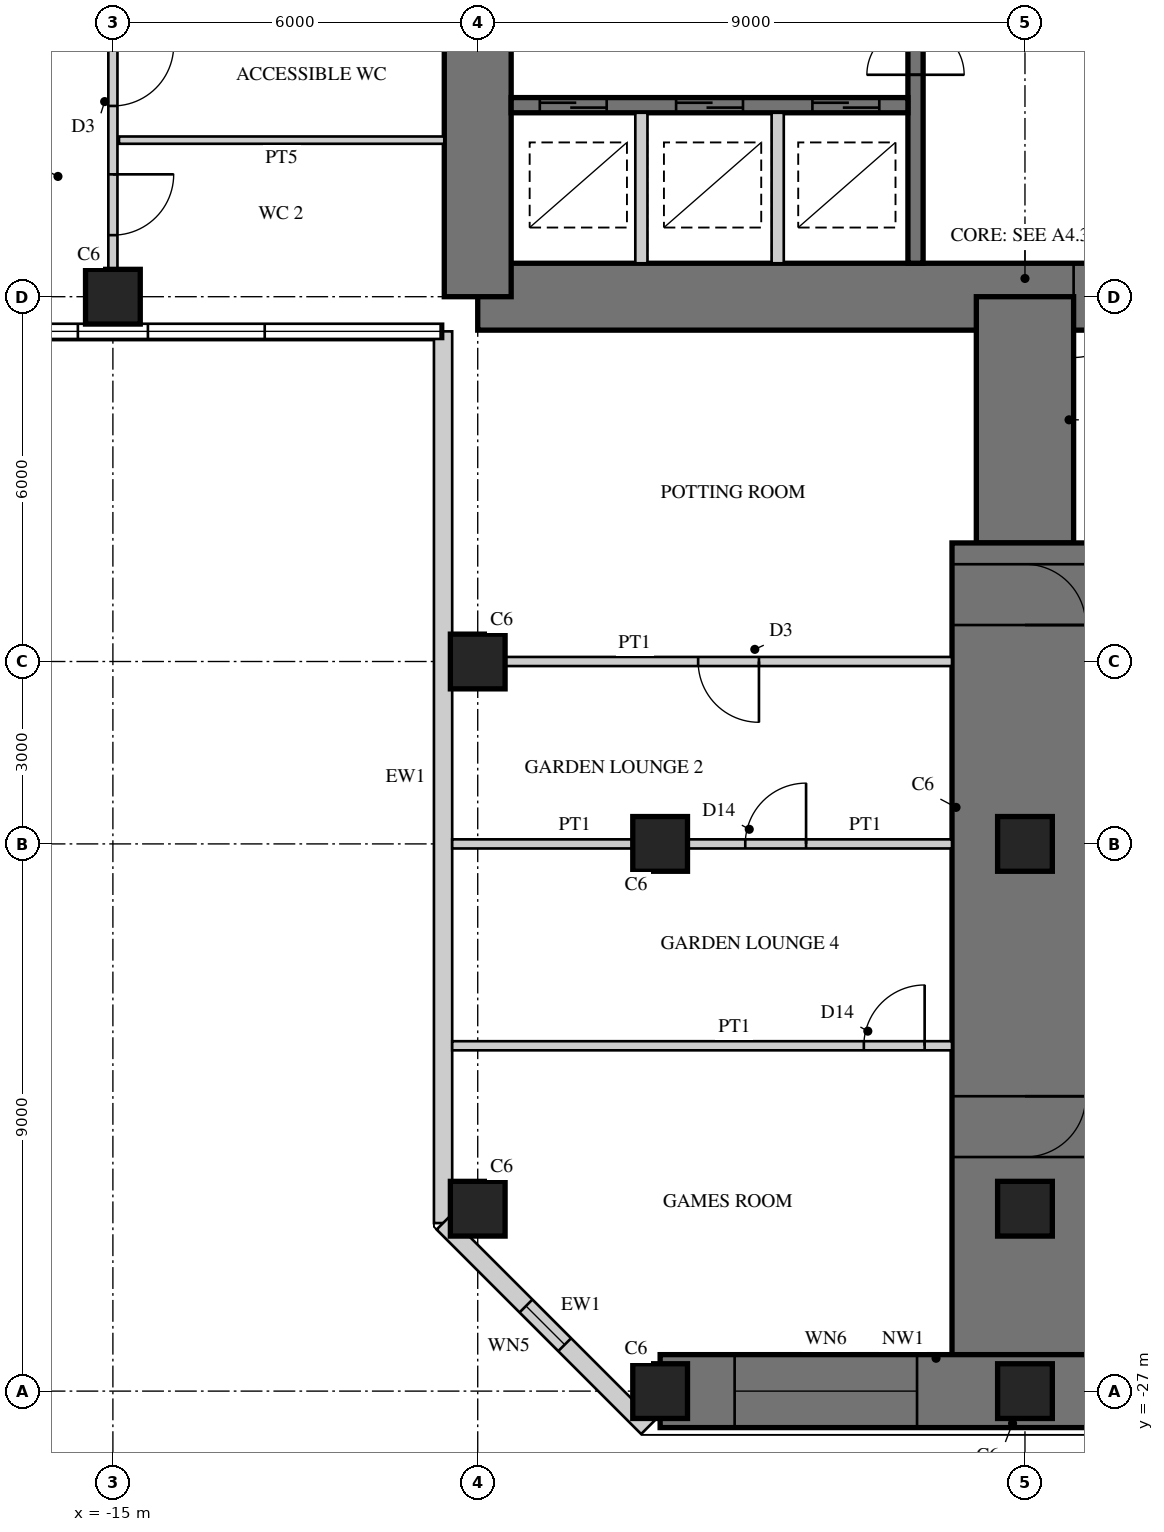
"""IFC4 building model, lengths in metres.
Left out: names, types, materials, properties, quantities, classifications, styles, units other than length and angle.
Written with IfcOpenShell. Run it as: python <this file> out.ifc"""

import sys

from ifc_helpers import new_model, si_unit, direction, frame, frame_2d, origin, origin_2d, place, context, subcontext, project, spatial, rectangle, hollow_rectangle, extrude, element, fill, save


model = new_model("IFC4")
c1 = context("Model", 3, precision=1e-05, world=origin(), true_north=direction((0.0, 1.0)))
c2 = subcontext(c1, "Body", "Model", "MODEL_VIEW")
j1 = project(units=[si_unit("LENGTHUNIT", "METRE"), si_unit("PLANEANGLEUNIT", "RADIAN")], contexts=[c1])
p1 = place(None, origin())
s1 = spatial("IfcSite", under=j1, at=p1, CompositionType="ELEMENT")
p2 = place(p1, origin())
s2 = spatial("IfcBuilding", under=s1, at=p2, CompositionType="ELEMENT")
p3 = place(p2, frame((0.0, 0.0, 217.1)))
s3 = spatial("IfcBuildingStorey", under=s2, at=p3, CompositionType="ELEMENT", Elevation=217.1)
p4 = place(p3, frame((-9.0, -9.0, 0.0), z_axis=(0.0, 0.0, 1.0), x_axis=(1.0, 0.0, 0.0)))
e1 = element("IfcWall", 1, at=p4, inside=s3, PredefinedType="SHEAR", context=c2, shape_type="SweptSolid", body=[
    extrude(rectangle(XDim=18.0, YDim=1.1, at=frame_2d((9.0, 0.0))), origin(), (0.0, 0.0, 1.0), 5.0),
])
p5 = place(p4, frame((9.8, 0.0, 0.0)))
e2 = element("IfcOpeningElement", 2, at=p5, cuts=e1, PredefinedType="OPENING", context=c2, shape_type="SweptSolid", body=[
    extrude(rectangle(XDim=1.0, YDim=2.4, at=frame_2d((0.5, 1.2))), frame((0.0, 0.56, 0.0), z_axis=(0.0, -1.0, 0.0), x_axis=(1.0, 0.0, 0.0)), (0.0, 0.0, 1.0), 1.12),
])
p6 = place(p3, frame((-9.0, 9.0, 0.0), z_axis=(0.0, 0.0, 1.0), x_axis=(0.0, -1.0, 0.0)))
e3 = element("IfcWall", 3, at=p6, inside=s3, PredefinedType="SHEAR", context=c2, shape_type="SweptSolid", body=[
    extrude(rectangle(XDim=18.0, YDim=1.1, at=frame_2d((9.0, 0.0))), origin(), (0.0, 0.0, 1.0), 5.0),
])
p7 = place(p6, frame((9.8, 0.0, 0.0)))
e4 = element("IfcOpeningElement", 4, at=p7, cuts=e3, PredefinedType="OPENING", context=c2, shape_type="SweptSolid", body=[
    extrude(rectangle(XDim=1.0, YDim=2.4, at=frame_2d((0.5, 1.2))), frame((0.0, 0.56, 0.0), z_axis=(0.0, -1.0, 0.0), x_axis=(1.0, 0.0, 0.0)), (0.0, 0.0, 1.0), 1.12),
])
p8 = place(p3, frame((-1.8, -1.875, 0.0), z_axis=(0.0, 0.0, 1.0), x_axis=(0.0, -1.0, 0.0)))
e5 = element("IfcWall", 5, at=p8, inside=s3, PredefinedType="SHEAR", context=c2, shape_type="SweptSolid", body=[
    extrude(rectangle(XDim=6.575, YDim=0.25, at=frame_2d((3.288, 0.0))), origin(), (0.0, 0.0, 1.0), 5.0),
])
p9 = place(p8, frame((1.875, 0.0, 0.0)))
e6 = element("IfcOpeningElement", 6, at=p9, cuts=e5, PredefinedType="OPENING", context=c2, shape_type="SweptSolid", body=[
    extrude(rectangle(XDim=1.6, YDim=2.4, at=frame_2d((0.8, 1.2))), frame((0.0, 0.135, 0.0), z_axis=(0.0, -1.0, 0.0), x_axis=(1.0, 0.0, 0.0)), (0.0, 0.0, 1.0), 0.27),
])
p10 = place(p3, frame((-1.925, -5.85, 0.0), z_axis=(0.0, 0.0, 1.0), x_axis=(-1.0, 0.0, 0.0)))
e7 = element("IfcWall", 7, at=p10, inside=s3, PredefinedType="SHEAR", context=c2, shape_type="SweptSolid", body=[
    extrude(rectangle(XDim=6.525, YDim=0.25, at=frame_2d((3.262, 0.0))), origin(), (0.0, 0.0, 1.0), 5.0),
])
p11 = place(p10, frame((0.471, 0.0, 0.0)))
e8 = element("IfcOpeningElement", 8, at=p11, cuts=e7, PredefinedType="OPENING", context=c2, shape_type="SweptSolid", body=[
    extrude(rectangle(XDim=1.1, YDim=2.2, at=frame_2d((0.55, 1.1))), frame((0.0, 0.135, 0.0), z_axis=(0.0, -1.0, 0.0), x_axis=(1.0, 0.0, 0.0)), (0.0, 0.0, 1.0), 0.27),
])
p12 = place(p10, frame((2.712, 0.0, 0.0)))
e9 = element("IfcOpeningElement", 9, at=p12, cuts=e7, PredefinedType="OPENING", context=c2, shape_type="SweptSolid", body=[
    extrude(rectangle(XDim=1.1, YDim=2.2, at=frame_2d((0.55, 1.1))), frame((0.0, 0.135, 0.0), z_axis=(0.0, -1.0, 0.0), x_axis=(1.0, 0.0, 0.0)), (0.0, 0.0, 1.0), 0.27),
])
p13 = place(p10, frame((4.954, 0.0, 0.0)))
e10 = element("IfcOpeningElement", 10, at=p13, cuts=e7, PredefinedType="OPENING", context=c2, shape_type="SweptSolid", body=[
    extrude(rectangle(XDim=1.1, YDim=2.2, at=frame_2d((0.55, 1.1))), frame((0.0, 0.135, 0.0), z_axis=(0.0, -1.0, 0.0), x_axis=(1.0, 0.0, 0.0)), (0.0, 0.0, 1.0), 0.27),
])
for number, where, z_axis, x_axis in (
    (11, (-4.067, -5.975, 0.0), (0.0, 0.0, 1.0), (0.0, -1.0, 0.0)),
    (12, (-6.308, -5.975, 0.0), (0.0, 0.0, 1.0), (0.0, -1.0, 0.0)),
):
    element("IfcWall", number, at=place(p3, frame(where, z_axis=z_axis, x_axis=x_axis)), inside=s3, PredefinedType="PARTITIONING", context=c2, shape_type="SweptSolid", body=[
        extrude(rectangle(XDim=2.475, YDim=0.2, at=frame_2d((1.237, 0.0))), origin(), (0.0, 0.0, 1.0), 5.0),
    ])
p14 = place(p3, frame((0.0, -9.0, 0.0), z_axis=(0.0, 0.0, 1.0), x_axis=(0.0, -1.0, 0.0)))
e13 = element("IfcWall", 13, at=p14, inside=s3, PredefinedType="SHEAR", context=c2, shape_type="SweptSolid", body=[
    extrude(rectangle(XDim=4.05, YDim=1.6, at=frame_2d((2.025, 0.0))), origin(), (0.0, 0.0, 1.0), 5.0),
])
p15 = place(p3, frame((0.0, -13.05, 0.0), z_axis=(0.0, 0.0, 1.0), x_axis=(0.0, -1.0, 0.0)))
e14 = element("IfcWall", 14, at=p15, inside=s3, PredefinedType="SHEAR", context=c2, shape_type="SweptSolid", body=[
    extrude(rectangle(XDim=13.95, YDim=2.4, at=frame_2d((6.975, 0.0))), origin(), (0.0, 0.0, 1.0), 5.0),
])
p16 = place(p15, frame((0.35, 0.0, 0.0)))
e15 = element("IfcOpeningElement", 15, at=p16, cuts=e14, PredefinedType="OPENING", context=c2, shape_type="SweptSolid", body=[
    extrude(rectangle(XDim=1.0, YDim=2.2, at=frame_2d((0.5, 1.1))), frame((0.0, 1.21, 0.0), z_axis=(0.0, -1.0, 0.0), x_axis=(1.0, 0.0, 0.0)), (0.0, 0.0, 1.0), 2.42),
])
p17 = place(p15, frame((9.1, 0.0, 0.0)))
e16 = element("IfcOpeningElement", 16, at=p17, cuts=e14, PredefinedType="OPENING", context=c2, shape_type="SweptSolid", body=[
    extrude(rectangle(XDim=1.0, YDim=2.2, at=frame_2d((0.5, 1.1))), frame((0.0, 1.21, 0.0), z_axis=(0.0, -1.0, 0.0), x_axis=(1.0, 0.0, 0.0)), (0.0, 0.0, 1.0), 2.42),
])
p18 = place(p3, frame((-6.0, -27.0, 0.0), z_axis=(0.0, 0.0, 1.0), x_axis=(1.0, 0.0, 0.0)))
e17 = element("IfcWall", 17, at=p18, inside=s3, PredefinedType="SHEAR", context=c2, shape_type="SweptSolid", body=[
    extrude(rectangle(XDim=12.0, YDim=1.2, at=frame_2d((6.0, 0.0))), origin(), (0.0, 0.0, 1.0), 5.0),
])
p19 = place(p18, frame((1.225, 0.0, 0.6)))
e18 = element("IfcOpeningElement", 18, at=p19, cuts=e17, PredefinedType="OPENING", context=c2, shape_type="SweptSolid", body=[
    extrude(rectangle(XDim=3.0, YDim=2.4, at=frame_2d((1.5, 1.2))), frame((0.0, 0.61, 0.0), z_axis=(0.0, -1.0, 0.0), x_axis=(1.0, 0.0, 0.0)), (0.0, 0.0, 1.0), 1.22),
])
p20 = place(p18, frame((7.775, 0.0, 0.6)))
e19 = element("IfcOpeningElement", 19, at=p20, cuts=e17, PredefinedType="OPENING", context=c2, shape_type="SweptSolid", body=[
    extrude(rectangle(XDim=3.0, YDim=2.4, at=frame_2d((1.5, 1.2))), frame((0.0, 0.61, 0.0), z_axis=(0.0, -1.0, 0.0), x_axis=(1.0, 0.0, 0.0)), (0.0, 0.0, 1.0), 1.22),
])
for number, where, z_axis, x_axis in (
    (20, (-9.0, -15.0, 0.0), (0.0, 0.0, 1.0), (1.0, 0.0, 0.0)),
    (21, (-9.0, -24.0, 0.0), (0.0, 0.0, 1.0), (1.0, 0.0, 0.0)),
    (22, (-6.0, -27.0, 0.0), (0.0, 0.0, 1.0), (1.0, 0.0, 0.0)),
    (23, (0.0, -27.0, 0.0), (0.0, 0.0, 1.0), (1.0, 0.0, 0.0)),
    (24, (-15.0, -9.0, 0.0), (0.0, 0.0, 1.0), (1.0, 0.0, 0.0)),
    (25, (-6.0, -18.0, 0.0), (0.0, 0.0, 1.0), (1.0, 0.0, 0.0)),
    (26, (0.0, -18.0, 0.0), (0.0, 0.0, 1.0), (1.0, 0.0, 0.0)),
    (27, (0.0, -24.0, 0.0), (0.0, 0.0, 1.0), (1.0, 0.0, 0.0)),
):
    element("IfcColumn", number, at=place(p3, frame(where, z_axis=z_axis, x_axis=x_axis)), inside=s3, PredefinedType="COLUMN", context=c2, shape_type="SweptSolid", body=[
        extrude(rectangle(XDim=0.9, YDim=0.9, at=origin_2d()), origin(), (0.0, 0.0, 1.0), 5.0),
    ])
p21 = place(p3, frame((-9.57, -9.57, 0.0), z_axis=(0.0, 0.0, 1.0), x_axis=(0.0, -1.0, 0.0)))
e28 = element("IfcWall", 28, at=p21, inside=s3, PredefinedType="SOLIDWALL", context=c2, shape_type="SweptSolid", body=[
    extrude(rectangle(XDim=14.666, YDim=0.3, at=frame_2d((7.333, 0.0))), origin(), (0.0, 0.0, 1.0), 4.82),
])
p22 = place(p3, frame((-9.57, -24.236, 0.0), z_axis=(0.0, 0.0, 1.0), x_axis=(0.707106781187, -0.707106781187, 0.0)))
e29 = element("IfcWall", 29, at=p22, inside=s3, PredefinedType="SOLIDWALL", context=c2, shape_type="SweptSolid", body=[
    extrude(rectangle(XDim=4.757, YDim=0.3, at=frame_2d((2.379, 0.0))), origin(), (0.0, 0.0, 1.0), 4.82),
])
p23 = place(p22, frame((1.929, 0.0, 0.3)))
e30 = element("IfcOpeningElement", 30, at=p23, cuts=e29, PredefinedType="OPENING", context=c2, shape_type="SweptSolid", body=[
    extrude(rectangle(XDim=0.9, YDim=2.4, at=frame_2d((0.45, 1.2))), frame((0.0, 0.16, 0.0), z_axis=(0.0, -1.0, 0.0), x_axis=(1.0, 0.0, 0.0)), (0.0, 0.0, 1.0), 0.32),
])
p24 = place(p3, frame((-8.55, -15.0, 0.0), z_axis=(0.0, 0.0, 1.0), x_axis=(1.0, 0.0, 0.0)))
e31 = element("IfcWall", 31, at=p24, inside=s3, PredefinedType="PARTITIONING", context=c2, shape_type="SweptSolid", body=[
    extrude(rectangle(XDim=7.35, YDim=0.15, at=frame_2d((3.675, 0.0))), origin(), (0.0, 0.0, 1.0), 4.07),
])
p25 = place(p24, frame((3.175, 0.0, 0.0)))
e32 = element("IfcOpeningElement", 32, at=p25, cuts=e31, PredefinedType="OPENING", context=c2, shape_type="SweptSolid", body=[
    extrude(rectangle(XDim=1.0, YDim=2.1, at=frame_2d((0.5, 1.05))), frame((0.0, 0.085, 0.0), z_axis=(0.0, -1.0, 0.0), x_axis=(1.0, 0.0, 0.0)), (0.0, 0.0, 1.0), 0.17),
])
p26 = place(p3, frame((-9.42, -21.32, 0.0), z_axis=(0.0, 0.0, 1.0), x_axis=(1.0, 0.0, 0.0)))
e33 = element("IfcWall", 33, at=p26, inside=s3, PredefinedType="PARTITIONING", context=c2, shape_type="SweptSolid", body=[
    extrude(rectangle(XDim=8.22, YDim=0.15, at=frame_2d((4.11, 0.0))), origin(), (0.0, 0.0, 1.0), 4.82),
])
p27 = place(p26, frame((6.77, 0.0, 0.0)))
e34 = element("IfcOpeningElement", 34, at=p27, cuts=e33, PredefinedType="OPENING", context=c2, shape_type="SweptSolid", body=[
    extrude(rectangle(XDim=1.0, YDim=2.2, at=frame_2d((0.5, 1.1))), frame((0.0, 0.085, 0.0), z_axis=(0.0, -1.0, 0.0), x_axis=(1.0, 0.0, 0.0)), (0.0, 0.0, 1.0), 0.17),
])
p28 = place(p3, frame((-5.55, -18.0, 0.0), z_axis=(0.0, 0.0, 1.0), x_axis=(1.0, 0.0, 0.0)))
e35 = element("IfcWall", 35, at=p28, inside=s3, PredefinedType="PARTITIONING", context=c2, shape_type="SweptSolid", body=[
    extrude(rectangle(XDim=4.35, YDim=0.15, at=frame_2d((2.175, 0.0))), origin(), (0.0, 0.0, 1.0), 4.82),
])
p29 = place(p28, frame((0.95, 0.0, 0.0)))
e36 = element("IfcOpeningElement", 36, at=p29, cuts=e35, PredefinedType="OPENING", context=c2, shape_type="SweptSolid", body=[
    extrude(rectangle(XDim=1.0, YDim=2.2, at=frame_2d((0.5, 1.1))), frame((0.0, 0.085, 0.0), z_axis=(0.0, -1.0, 0.0), x_axis=(1.0, 0.0, 0.0)), (0.0, 0.0, 1.0), 0.17),
])
p30 = place(p3, frame((-9.42, -18.0, 0.0), z_axis=(0.0, 0.0, 1.0), x_axis=(1.0, 0.0, 0.0)))
e37 = element("IfcWall", 37, at=p30, inside=s3, PredefinedType="PARTITIONING", context=c2, shape_type="SweptSolid", body=[
    extrude(rectangle(XDim=2.97, YDim=0.15, at=frame_2d((1.485, 0.0))), origin(), (0.0, 0.0, 1.0), 4.82),
])
p31 = place(p3, frame((-15.0, -2.175, 0.0), z_axis=(0.0, 0.0, 1.0), x_axis=(0.0, -1.0, 0.0)))
e38 = element("IfcWall", 38, at=p31, inside=s3, PredefinedType="PARTITIONING", context=c2, shape_type="SweptSolid", body=[
    extrude(rectangle(XDim=6.375, YDim=0.15, at=frame_2d((3.188, 0.0))), origin(), (0.0, 0.0, 1.0), 4.07),
])
p32 = place(p31, frame((0.562, 0.0, 0.0)))
e39 = element("IfcOpeningElement", 39, at=p32, cuts=e38, PredefinedType="OPENING", context=c2, shape_type="SweptSolid", body=[
    extrude(rectangle(XDim=1.0, YDim=2.1, at=frame_2d((0.5, 1.05))), frame((0.0, 0.085, 0.0), z_axis=(0.0, -1.0, 0.0), x_axis=(1.0, 0.0, 0.0)), (0.0, 0.0, 1.0), 0.17),
])
p33 = place(p31, frame((2.688, 0.0, 0.0)))
e40 = element("IfcOpeningElement", 40, at=p33, cuts=e38, PredefinedType="OPENING", context=c2, shape_type="SweptSolid", body=[
    extrude(rectangle(XDim=1.0, YDim=2.1, at=frame_2d((0.5, 1.05))), frame((0.0, 0.085, 0.0), z_axis=(0.0, -1.0, 0.0), x_axis=(1.0, 0.0, 0.0)), (0.0, 0.0, 1.0), 0.17),
])
p34 = place(p31, frame((4.812, 0.0, 0.0)))
e41 = element("IfcOpeningElement", 41, at=p34, cuts=e38, PredefinedType="OPENING", context=c2, shape_type="SweptSolid", body=[
    extrude(rectangle(XDim=1.0, YDim=2.1, at=frame_2d((0.5, 1.05))), frame((0.0, 0.085, 0.0), z_axis=(0.0, -1.0, 0.0), x_axis=(1.0, 0.0, 0.0)), (0.0, 0.0, 1.0), 0.17),
])
p35 = place(p3, frame((-9.55, -6.425, 0.0), z_axis=(0.0, 0.0, 1.0), x_axis=(-1.0, 0.0, 0.0)))
e42 = element("IfcWall", 42, at=p35, inside=s3, PredefinedType="PLUMBINGWALL", context=c2, shape_type="SweptSolid", body=[
    extrude(rectangle(XDim=5.35, YDim=0.12, at=frame_2d((2.675, 0.0))), origin(), (0.0, 0.0, 1.0), 4.82),
])
p36 = place(p23, origin())
e43 = element("IfcWindow", 43, at=p36, inside=s3, PartitioningType="SINGLE_PANEL", PredefinedType="WINDOW", context=c2, shape_type="SweptSolid", body=[
    extrude(hollow_rectangle(XDim=0.9, YDim=2.4, WallThickness=0.06, at=frame_2d((0.45, 1.2))), frame((0.0, 0.03, 0.0), z_axis=(0.0, -1.0, 0.0), x_axis=(1.0, 0.0, 0.0)), (0.0, 0.0, 1.0), 0.06),
    extrude(rectangle(XDim=0.779, YDim=2.279, at=frame_2d((0.45, 1.2))), frame((0.0, 0.03, 0.0), z_axis=(0.0, -1.0, 0.0), x_axis=(1.0, 0.0, 0.0)), (0.0, 0.0, 1.0), 0.06),
])
fill(e30, e43)
p37 = place(p19, origin())
e44 = element("IfcWindow", 44, at=p37, inside=s3, PartitioningType="SINGLE_PANEL", PredefinedType="WINDOW", context=c2, shape_type="SweptSolid", body=[
    extrude(hollow_rectangle(XDim=3.0, YDim=2.4, WallThickness=0.06, at=frame_2d((1.5, 1.2))), frame((0.0, 0.03, 0.0), z_axis=(0.0, -1.0, 0.0), x_axis=(1.0, 0.0, 0.0)), (0.0, 0.0, 1.0), 0.06),
    extrude(rectangle(XDim=2.879, YDim=2.279, at=frame_2d((1.5, 1.2))), frame((0.0, 0.03, 0.0), z_axis=(0.0, -1.0, 0.0), x_axis=(1.0, 0.0, 0.0)), (0.0, 0.0, 1.0), 0.06),
])
fill(e18, e44)
p38 = place(p25, frame((1.0, 0.0, 0.0), z_axis=(0.0, 0.0, 1.0), x_axis=(-1.0, 0.0, 0.0)))
e45 = element("IfcDoor", 45, at=p38, inside=s3, OperationType="SINGLE_SWING_LEFT", PredefinedType="DOOR", context=c2, shape_type="SweptSolid", body=[
    extrude(rectangle(XDim=1.0, YDim=2.1, at=frame_2d((0.5, 1.05))), frame((0.0, 0.025, 0.0), z_axis=(0.0, -1.0, 0.0), x_axis=(1.0, 0.0, 0.0)), (0.0, 0.0, 1.0), 0.05),
])
fill(e32, e45)
p39 = place(p27, origin())
e46 = element("IfcDoor", 46, at=p39, inside=s3, OperationType="SINGLE_SWING_RIGHT", PredefinedType="DOOR", context=c2, shape_type="SweptSolid", body=[
    extrude(rectangle(XDim=1.0, YDim=2.2, at=frame_2d((0.5, 1.1))), frame((0.0, 0.025, 0.0), z_axis=(0.0, -1.0, 0.0), x_axis=(1.0, 0.0, 0.0)), (0.0, 0.0, 1.0), 0.05),
])
fill(e34, e46)
p40 = place(p29, origin())
e47 = element("IfcDoor", 47, at=p40, inside=s3, OperationType="SINGLE_SWING_RIGHT", PredefinedType="DOOR", context=c2, shape_type="SweptSolid", body=[
    extrude(rectangle(XDim=1.0, YDim=2.2, at=frame_2d((0.5, 1.1))), frame((0.0, 0.025, 0.0), z_axis=(0.0, -1.0, 0.0), x_axis=(1.0, 0.0, 0.0)), (0.0, 0.0, 1.0), 0.05),
])
fill(e36, e47)
p41 = place(p33, origin())
e48 = element("IfcDoor", 48, at=p41, inside=s3, OperationType="SINGLE_SWING_LEFT", PredefinedType="DOOR", context=c2, shape_type="SweptSolid", body=[
    extrude(rectangle(XDim=1.0, YDim=2.1, at=frame_2d((0.5, 1.05))), frame((0.0, 0.025, 0.0), z_axis=(0.0, -1.0, 0.0), x_axis=(1.0, 0.0, 0.0)), (0.0, 0.0, 1.0), 0.05),
])
fill(e40, e48)
p42 = place(p34, origin())
e49 = element("IfcDoor", 49, at=p42, inside=s3, OperationType="SINGLE_SWING_LEFT", PredefinedType="DOOR", context=c2, shape_type="SweptSolid", body=[
    extrude(rectangle(XDim=1.0, YDim=2.1, at=frame_2d((0.5, 1.05))), frame((0.0, 0.025, 0.0), z_axis=(0.0, -1.0, 0.0), x_axis=(1.0, 0.0, 0.0)), (0.0, 0.0, 1.0), 0.05),
])
fill(e41, e49)
p43 = place(p16, origin())
e50 = element("IfcDoor", 50, at=p43, inside=s3, OperationType="SINGLE_SWING_RIGHT", PredefinedType="DOOR", context=c2, shape_type="SweptSolid", body=[
    extrude(rectangle(XDim=1.0, YDim=2.2, at=frame_2d((0.5, 1.1))), frame((0.0, 0.025, 0.0), z_axis=(0.0, -1.0, 0.0), x_axis=(1.0, 0.0, 0.0)), (0.0, 0.0, 1.0), 0.05),
])
fill(e15, e50)
p44 = place(p17, origin())
e51 = element("IfcDoor", 51, at=p44, inside=s3, OperationType="SINGLE_SWING_LEFT", PredefinedType="DOOR", context=c2, shape_type="SweptSolid", body=[
    extrude(rectangle(XDim=1.0, YDim=2.2, at=frame_2d((0.5, 1.1))), frame((0.0, 0.025, 0.0), z_axis=(0.0, -1.0, 0.0), x_axis=(1.0, 0.0, 0.0)), (0.0, 0.0, 1.0), 0.05),
])
fill(e16, e51)
p45 = place(p5, frame((1.0, 0.0, 0.0), z_axis=(0.0, 0.0, 1.0), x_axis=(-1.0, 0.0, 0.0)))
e52 = element("IfcDoor", 52, at=p45, inside=s3, OperationType="SINGLE_SWING_RIGHT", PredefinedType="DOOR", context=c2, shape_type="SweptSolid", body=[
    extrude(rectangle(XDim=1.0, YDim=2.4, at=frame_2d((0.5, 1.2))), frame((0.0, -0.005, 0.0), z_axis=(0.0, -1.0, 0.0), x_axis=(1.0, 0.0, 0.0)), (0.0, 0.0, 1.0), 0.05),
])
fill(e2, e52)
p46 = place(p11, origin())
e53 = element("IfcDoor", 53, at=p46, inside=s3, OperationType="DOUBLE_DOOR_SLIDING", PredefinedType="DOOR", context=c2, shape_type="SweptSolid", body=[
    extrude(rectangle(XDim=1.1, YDim=2.2, at=frame_2d((0.55, 1.1))), frame((0.0, 0.025, 0.0), z_axis=(0.0, -1.0, 0.0), x_axis=(1.0, 0.0, 0.0)), (0.0, 0.0, 1.0), 0.05),
])
fill(e8, e53)
p47 = place(p12, origin())
e54 = element("IfcDoor", 54, at=p47, inside=s3, OperationType="DOUBLE_DOOR_SLIDING", PredefinedType="DOOR", context=c2, shape_type="SweptSolid", body=[
    extrude(rectangle(XDim=1.1, YDim=2.2, at=frame_2d((0.55, 1.1))), frame((0.0, 0.025, 0.0), z_axis=(0.0, -1.0, 0.0), x_axis=(1.0, 0.0, 0.0)), (0.0, 0.0, 1.0), 0.05),
])
fill(e9, e54)
p48 = place(p13, origin())
e55 = element("IfcDoor", 55, at=p48, inside=s3, OperationType="DOUBLE_DOOR_SLIDING", PredefinedType="DOOR", context=c2, shape_type="SweptSolid", body=[
    extrude(rectangle(XDim=1.1, YDim=2.2, at=frame_2d((0.55, 1.1))), frame((0.0, 0.025, 0.0), z_axis=(0.0, -1.0, 0.0), x_axis=(1.0, 0.0, 0.0)), (0.0, 0.0, 1.0), 0.05),
])
fill(e10, e55)
p49 = place(p9, origin())
e56 = element("IfcDoor", 56, at=p49, inside=s3, OperationType="DOUBLE_DOOR_DOUBLE_SWING", PredefinedType="DOOR", context=c2, shape_type="SweptSolid", body=[
    extrude(rectangle(XDim=1.6, YDim=2.4, at=frame_2d((0.8, 1.2))), frame((0.0, 0.025, 0.0), z_axis=(0.0, -1.0, 0.0), x_axis=(1.0, 0.0, 0.0)), (0.0, 0.0, 1.0), 0.05),
])
fill(e6, e56)
save(model, sys.argv[1])
